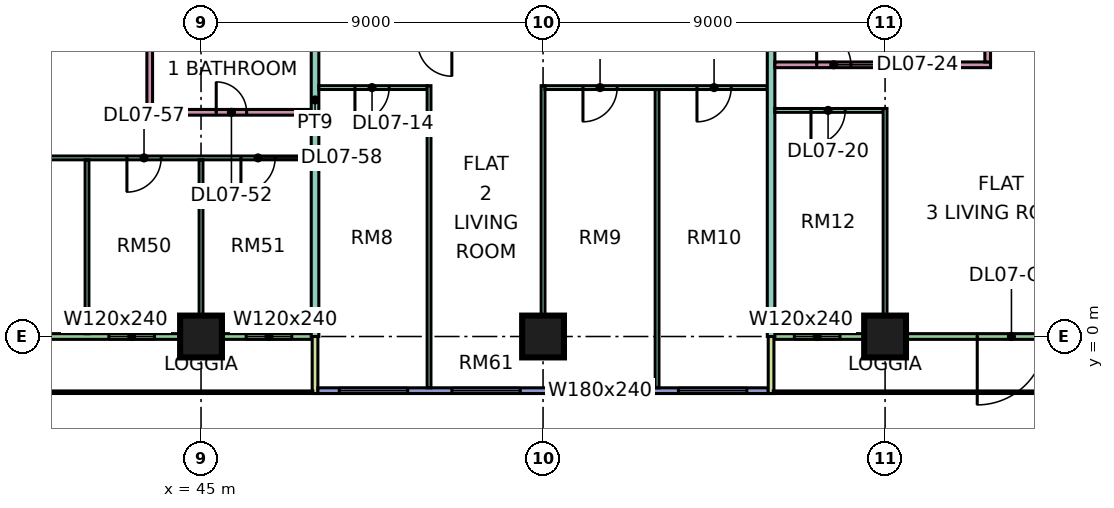
"""IFC4 building model, lengths in metres.
Left out: names, types, materials, properties, quantities, classifications, styles, units other than length and angle.
Written with IfcOpenShell. Run it as: python <this file> out.ifc"""

import sys

from ifc_helpers import new_model, si_unit, direction, frame, frame_2d, origin, origin_2d, place, context, subcontext, project, spatial, rectangle, extrude, element, fill, save


model = new_model("IFC4")
c1 = context("Model", 3, precision=1e-05, world=origin(), true_north=direction((0.0, 1.0)))
c2 = subcontext(c1, "Body", "Model", "MODEL_VIEW")
j1 = project(units=[si_unit("LENGTHUNIT", "METRE"), si_unit("PLANEANGLEUNIT", "RADIAN")], contexts=[c1])
p1 = place(None, origin())
s1 = spatial("IfcSite", under=j1, at=p1, CompositionType="ELEMENT")
p2 = place(p1, origin())
s2 = spatial("IfcBuilding", under=s1, at=p2, CompositionType="ELEMENT")
p3 = place(p2, frame((0.0, 0.0, 41.4)))
s3 = spatial("IfcBuildingStorey", under=s2, at=p3, CompositionType="ELEMENT", Elevation=41.4)
for number, where, z_axis, x_axis in (
    (1, (45.0, 0.0, 0.0), (0.0, 0.0, 1.0), (1.0, 0.0, 0.0)),
    (2, (54.0, 0.0, 0.0), (0.0, 0.0, 1.0), (1.0, 0.0, 0.0)),
    (3, (63.0, 0.0, 0.0), (0.0, 0.0, 1.0), (1.0, 0.0, 0.0)),
):
    element("IfcColumn", number, at=place(p3, frame(where, z_axis=z_axis, x_axis=x_axis)), inside=s3, PredefinedType="COLUMN", context=c2, shape_type="SweptSolid", body=[
        extrude(rectangle(XDim=1.1, YDim=1.1, at=origin_2d()), origin(), (0.0, 0.0, 1.0), 3.75),
    ])
p4 = place(p3, frame((36.075, 0.0, 0.0), z_axis=(0.0, 0.0, 1.0), x_axis=(1.0, 0.0, 0.0)))
e4 = element("IfcWall", 4, at=p4, inside=s3, PredefinedType="SOLIDWALL", context=c2, shape_type="SweptSolid", body=[
    extrude(rectangle(XDim=11.85, YDim=0.15, at=frame_2d((5.925, 0.0))), origin(), (0.0, 0.0, 1.0), 3.35),
])
p5 = place(p4, frame((2.35, 0.0, 0.0)))
e5 = element("IfcOpeningElement", 5, at=p5, cuts=e4, PredefinedType="OPENING", context=c2, shape_type="SweptSolid", body=[
    extrude(rectangle(XDim=1.8, YDim=2.4, at=frame_2d((0.9, 1.2))), frame((0.0, 0.085, 0.0), z_axis=(0.0, -1.0, 0.0), x_axis=(1.0, 0.0, 0.0)), (0.0, 0.0, 1.0), 0.17),
])
p6 = place(p4, frame((6.5, 0.0, 0.45)))
e6 = element("IfcOpeningElement", 6, at=p6, cuts=e4, PredefinedType="OPENING", context=c2, shape_type="SweptSolid", body=[
    extrude(rectangle(XDim=1.2, YDim=2.4, at=frame_2d((0.6, 1.2))), frame((0.0, 0.085, 0.0), z_axis=(0.0, -1.0, 0.0), x_axis=(1.0, 0.0, 0.0)), (0.0, 0.0, 1.0), 0.17),
])
p7 = place(p4, frame((10.113, 0.0, 0.45)))
e7 = element("IfcOpeningElement", 7, at=p7, cuts=e4, PredefinedType="OPENING", context=c2, shape_type="SweptSolid", body=[
    extrude(rectangle(XDim=1.2, YDim=2.4, at=frame_2d((0.6, 1.2))), frame((0.0, 0.085, 0.0), z_axis=(0.0, -1.0, 0.0), x_axis=(1.0, 0.0, 0.0)), (0.0, 0.0, 1.0), 0.17),
])
p8 = place(p3, frame((48.0, -1.5, 0.0), z_axis=(0.0, 0.0, 1.0), x_axis=(0.0, 1.0, 0.0)))
e8 = element("IfcWall", 8, at=p8, inside=s3, PredefinedType="SOLIDWALL", context=c2, shape_type="SweptSolid", body=[
    extrude(rectangle(XDim=1.5, YDim=0.15, at=frame_2d((0.75, 0.0))), origin(), (0.0, 0.0, 1.0), 3.35),
])
p9 = place(p3, frame((48.075, -1.425, 0.0), z_axis=(0.0, 0.0, 1.0), x_axis=(1.0, 0.0, 0.0)))
e9 = element("IfcWall", 9, at=p9, inside=s3, PredefinedType="SOLIDWALL", context=c2, shape_type="SweptSolid", body=[
    extrude(rectangle(XDim=11.85, YDim=0.15, at=frame_2d((5.925, 0.0))), origin(), (0.0, 0.0, 1.0), 3.35),
])
p10 = place(p9, frame((0.562, 0.0, 0.45)))
e10 = element("IfcOpeningElement", 10, at=p10, cuts=e9, PredefinedType="OPENING", context=c2, shape_type="SweptSolid", body=[
    extrude(rectangle(XDim=1.8, YDim=2.4, at=frame_2d((0.9, 1.2))), frame((0.0, 0.085, 0.0), z_axis=(0.0, -1.0, 0.0), x_axis=(1.0, 0.0, 0.0)), (0.0, 0.0, 1.0), 0.17),
])
p11 = place(p9, frame((3.525, 0.0, 0.45)))
e11 = element("IfcOpeningElement", 11, at=p11, cuts=e9, PredefinedType="OPENING", context=c2, shape_type="SweptSolid", body=[
    extrude(rectangle(XDim=1.8, YDim=2.4, at=frame_2d((0.9, 1.2))), frame((0.0, 0.085, 0.0), z_axis=(0.0, -1.0, 0.0), x_axis=(1.0, 0.0, 0.0)), (0.0, 0.0, 1.0), 0.17),
])
p12 = place(p9, frame((6.525, 0.0, 0.45)))
e12 = element("IfcOpeningElement", 12, at=p12, cuts=e9, PredefinedType="OPENING", context=c2, shape_type="SweptSolid", body=[
    extrude(rectangle(XDim=1.8, YDim=2.4, at=frame_2d((0.9, 1.2))), frame((0.0, 0.085, 0.0), z_axis=(0.0, -1.0, 0.0), x_axis=(1.0, 0.0, 0.0)), (0.0, 0.0, 1.0), 0.17),
])
p13 = place(p9, frame((9.488, 0.0, 0.45)))
e13 = element("IfcOpeningElement", 13, at=p13, cuts=e9, PredefinedType="OPENING", context=c2, shape_type="SweptSolid", body=[
    extrude(rectangle(XDim=1.8, YDim=2.4, at=frame_2d((0.9, 1.2))), frame((0.0, 0.085, 0.0), z_axis=(0.0, -1.0, 0.0), x_axis=(1.0, 0.0, 0.0)), (0.0, 0.0, 1.0), 0.17),
])
p14 = place(p3, frame((60.075, 0.0, 0.0), z_axis=(0.0, 0.0, 1.0), x_axis=(1.0, 0.0, 0.0)))
e14 = element("IfcWall", 14, at=p14, inside=s3, PredefinedType="SOLIDWALL", context=c2, shape_type="SweptSolid", body=[
    extrude(rectangle(XDim=10.35, YDim=0.15, at=frame_2d((5.175, 0.0))), origin(), (0.0, 0.0, 1.0), 3.35),
])
p15 = place(p14, frame((0.538, 0.0, 0.45)))
e15 = element("IfcOpeningElement", 15, at=p15, cuts=e14, PredefinedType="OPENING", context=c2, shape_type="SweptSolid", body=[
    extrude(rectangle(XDim=1.2, YDim=2.4, at=frame_2d((0.6, 1.2))), frame((0.0, 0.085, 0.0), z_axis=(0.0, -1.0, 0.0), x_axis=(1.0, 0.0, 0.0)), (0.0, 0.0, 1.0), 0.17),
])
p16 = place(p14, frame((5.35, 0.0, 0.0)))
e16 = element("IfcOpeningElement", 16, at=p16, cuts=e14, PredefinedType="OPENING", context=c2, shape_type="SweptSolid", body=[
    extrude(rectangle(XDim=1.8, YDim=2.4, at=frame_2d((0.9, 1.2))), frame((0.0, 0.085, 0.0), z_axis=(0.0, -1.0, 0.0), x_axis=(1.0, 0.0, 0.0)), (0.0, 0.0, 1.0), 0.17),
])
p17 = place(p14, frame((9.188, 0.0, 0.45)))
e17 = element("IfcOpeningElement", 17, at=p17, cuts=e14, PredefinedType="OPENING", context=c2, shape_type="SweptSolid", body=[
    extrude(rectangle(XDim=0.9, YDim=2.4, at=frame_2d((0.45, 1.2))), frame((0.0, 0.085, 0.0), z_axis=(0.0, -1.0, 0.0), x_axis=(1.0, 0.0, 0.0)), (0.0, 0.0, 1.0), 0.17),
])
p18 = place(p3, frame((60.0, -1.5, 0.0), z_axis=(0.0, 0.0, 1.0), x_axis=(0.0, 1.0, 0.0)))
e18 = element("IfcWall", 18, at=p18, inside=s3, PredefinedType="SOLIDWALL", context=c2, shape_type="SweptSolid", body=[
    extrude(rectangle(XDim=1.5, YDim=0.15, at=frame_2d((0.75, 0.0))), origin(), (0.0, 0.0, 1.0), 3.35),
])
p19 = place(p3, frame((33.05, 4.7, 0.0), z_axis=(0.0, 0.0, 1.0), x_axis=(1.0, 0.0, 0.0)))
e19 = element("IfcWall", 19, at=p19, inside=s3, PredefinedType="PARTITIONING", context=c2, shape_type="SweptSolid", body=[
    extrude(rectangle(XDim=14.85, YDim=0.1, at=frame_2d((7.425, 0.0))), origin(), (0.0, 0.0, 1.0), 3.35),
])
p20 = place(p19, frame((10.0, 0.0, 0.0)))
e20 = element("IfcOpeningElement", 20, at=p20, cuts=e19, PredefinedType="OPENING", context=c2, shape_type="SweptSolid", body=[
    extrude(rectangle(XDim=0.9, YDim=2.1, at=frame_2d((0.45, 1.05))), frame((0.0, 0.06, 0.0), z_axis=(0.0, -1.0, 0.0), x_axis=(1.0, 0.0, 0.0)), (0.0, 0.0, 1.0), 0.12),
])
p21 = place(p19, frame((13.0, 0.0, 0.0)))
e21 = element("IfcOpeningElement", 21, at=p21, cuts=e19, PredefinedType="OPENING", context=c2, shape_type="SweptSolid", body=[
    extrude(rectangle(XDim=0.9, YDim=2.1, at=frame_2d((0.45, 1.05))), frame((0.0, 0.06, 0.0), z_axis=(0.0, -1.0, 0.0), x_axis=(1.0, 0.0, 0.0)), (0.0, 0.0, 1.0), 0.12),
])
p22 = place(p19, frame((4.0, 0.0, 0.0)))
e22 = element("IfcOpeningElement", 22, at=p22, cuts=e19, PredefinedType="OPENING", context=c2, shape_type="SweptSolid", body=[
    extrude(rectangle(XDim=0.9, YDim=2.1, at=frame_2d((0.45, 1.05))), frame((0.0, 0.06, 0.0), z_axis=(0.0, -1.0, 0.0), x_axis=(1.0, 0.0, 0.0)), (0.0, 0.0, 1.0), 0.12),
])
p23 = place(p3, frame((42.0, 0.074, 0.0), z_axis=(0.0, 0.0, 1.0), x_axis=(0.0, 1.0, 0.0)))
e23 = element("IfcWall", 23, at=p23, inside=s3, PredefinedType="PARTITIONING", context=c2, shape_type="SweptSolid", body=[
    extrude(rectangle(XDim=4.576, YDim=0.1, at=frame_2d((2.288, 0.0))), origin(), (0.0, 0.0, 1.0), 3.35),
])
p24 = place(p3, frame((43.65, 5.825, 0.0), z_axis=(0.0, 0.0, 1.0), x_axis=(0.0, 1.0, 0.0)))
e24 = element("IfcWall", 24, at=p24, inside=s3, PredefinedType="PARTITIONING", context=c2, shape_type="SweptSolid", body=[
    extrude(rectangle(XDim=6.625, YDim=0.15, at=frame_2d((3.312, 0.0))), origin(), (0.0, 0.0, 1.0), 3.35),
])
p25 = place(p24, frame((4.425, 0.0, 0.0)))
e25 = element("IfcOpeningElement", 25, at=p25, cuts=e24, PredefinedType="OPENING", context=c2, shape_type="SweptSolid", body=[
    extrude(rectangle(XDim=0.9, YDim=2.1, at=frame_2d((0.45, 1.05))), frame((0.0, 0.085, 0.0), z_axis=(0.0, -1.0, 0.0), x_axis=(1.0, 0.0, 0.0)), (0.0, 0.0, 1.0), 0.17),
])
p26 = place(p3, frame((43.725, 5.9, 0.0), z_axis=(0.0, 0.0, 1.0), x_axis=(1.0, 0.0, 0.0)))
e26 = element("IfcWall", 26, at=p26, inside=s3, PredefinedType="PARTITIONING", context=c2, shape_type="SweptSolid", body=[
    extrude(rectangle(XDim=4.175, YDim=0.15, at=frame_2d((2.087, 0.0))), origin(), (0.0, 0.0, 1.0), 3.35),
])
p27 = place(p26, frame((1.675, 0.0, 0.0)))
e27 = element("IfcOpeningElement", 27, at=p27, cuts=e26, PredefinedType="OPENING", context=c2, shape_type="SweptSolid", body=[
    extrude(rectangle(XDim=0.8, YDim=2.1, at=frame_2d((0.4, 1.05))), frame((0.0, 0.085, 0.0), z_axis=(0.0, -1.0, 0.0), x_axis=(1.0, 0.0, 0.0)), (0.0, 0.0, 1.0), 0.17),
])
p28 = place(p3, frame((45.0, 0.074, 0.0), z_axis=(0.0, 0.0, 1.0), x_axis=(0.0, 1.0, 0.0)))
e28 = element("IfcWall", 28, at=p28, inside=s3, PredefinedType="PARTITIONING", context=c2, shape_type="SweptSolid", body=[
    extrude(rectangle(XDim=4.576, YDim=0.1, at=frame_2d((2.288, 0.0))), origin(), (0.0, 0.0, 1.0), 3.35),
])
p29 = place(p3, frame((48.0, 0.0, 0.0), z_axis=(0.0, 0.0, 1.0), x_axis=(0.0, 1.0, 0.0)))
e29 = element("IfcWall", 29, at=p29, inside=s3, PredefinedType="PARTITIONING", context=c2, shape_type="SweptSolid", body=[
    extrude(rectangle(XDim=12.45, YDim=0.2, at=frame_2d((6.225, 0.0))), origin(), (0.0, 0.0, 1.0), 3.35),
])
p30 = place(p3, frame((48.1, 6.55, 0.0), z_axis=(0.0, 0.0, 1.0), x_axis=(1.0, 0.0, 0.0)))
e30 = element("IfcWall", 30, at=p30, inside=s3, PredefinedType="PARTITIONING", context=c2, shape_type="SweptSolid", body=[
    extrude(rectangle(XDim=2.85, YDim=0.1, at=frame_2d((1.425, 0.0))), origin(), (0.0, 0.0, 1.0), 3.35),
])
p31 = place(p30, frame((0.95, 0.0, 0.0)))
e31 = element("IfcOpeningElement", 31, at=p31, cuts=e30, PredefinedType="OPENING", context=c2, shape_type="SweptSolid", body=[
    extrude(rectangle(XDim=0.9, YDim=2.1, at=frame_2d((0.45, 1.05))), frame((0.0, 0.06, 0.0), z_axis=(0.0, -1.0, 0.0), x_axis=(1.0, 0.0, 0.0)), (0.0, 0.0, 1.0), 0.12),
])
p32 = place(p3, frame((51.0, -1.35, 0.0), z_axis=(0.0, 0.0, 1.0), x_axis=(0.0, 1.0, 0.0)))
e32 = element("IfcWall", 32, at=p32, inside=s3, PredefinedType="PARTITIONING", context=c2, shape_type="SweptSolid", body=[
    extrude(rectangle(XDim=7.95, YDim=0.1, at=frame_2d((3.975, 0.0))), origin(), (0.0, 0.0, 1.0), 3.35),
])
p33 = place(p3, frame((54.0, 0.0, 0.0), z_axis=(0.0, 0.0, 1.0), x_axis=(0.0, 1.0, 0.0)))
e33 = element("IfcWall", 33, at=p33, inside=s3, PredefinedType="PARTITIONING", context=c2, shape_type="SweptSolid", body=[
    extrude(rectangle(XDim=6.6, YDim=0.1, at=frame_2d((3.3, 0.0))), origin(), (0.0, 0.0, 1.0), 3.35),
])
p34 = place(p3, frame((54.05, 6.55, 0.0), z_axis=(0.0, 0.0, 1.0), x_axis=(1.0, 0.0, 0.0)))
e34 = element("IfcWall", 34, at=p34, inside=s3, PredefinedType="PARTITIONING", context=c2, shape_type="SweptSolid", body=[
    extrude(rectangle(XDim=5.85, YDim=0.1, at=frame_2d((2.925, 0.0))), origin(), (0.0, 0.0, 1.0), 3.35),
])
p35 = place(p34, frame((1.0, 0.0, 0.0)))
e35 = element("IfcOpeningElement", 35, at=p35, cuts=e34, PredefinedType="OPENING", context=c2, shape_type="SweptSolid", body=[
    extrude(rectangle(XDim=0.9, YDim=2.1, at=frame_2d((0.45, 1.05))), frame((0.0, 0.06, 0.0), z_axis=(0.0, -1.0, 0.0), x_axis=(1.0, 0.0, 0.0)), (0.0, 0.0, 1.0), 0.12),
])
p36 = place(p34, frame((4.0, 0.0, 0.0)))
e36 = element("IfcOpeningElement", 36, at=p36, cuts=e34, PredefinedType="OPENING", context=c2, shape_type="SweptSolid", body=[
    extrude(rectangle(XDim=0.9, YDim=2.1, at=frame_2d((0.45, 1.05))), frame((0.0, 0.06, 0.0), z_axis=(0.0, -1.0, 0.0), x_axis=(1.0, 0.0, 0.0)), (0.0, 0.0, 1.0), 0.12),
])
p37 = place(p3, frame((57.0, -1.351, 0.0), z_axis=(0.0, 0.0, 1.0), x_axis=(0.0, 1.0, 0.0)))
e37 = element("IfcWall", 37, at=p37, inside=s3, PredefinedType="PARTITIONING", context=c2, shape_type="SweptSolid", body=[
    extrude(rectangle(XDim=7.851, YDim=0.1, at=frame_2d((3.926, 0.0))), origin(), (0.0, 0.0, 1.0), 3.35),
])
p38 = place(p3, frame((60.0, 0.0, 0.0), z_axis=(0.0, 0.0, 1.0), x_axis=(0.0, 1.0, 0.0)))
e38 = element("IfcWall", 38, at=p38, inside=s3, PredefinedType="PARTITIONING", context=c2, shape_type="SweptSolid", body=[
    extrude(rectangle(XDim=12.45, YDim=0.2, at=frame_2d((6.225, 0.0))), origin(), (0.0, 0.0, 1.0), 3.35),
])
p39 = place(p3, frame((60.1, 5.95, 0.0), z_axis=(0.0, 0.0, 1.0), x_axis=(1.0, 0.0, 0.0)))
e39 = element("IfcWall", 39, at=p39, inside=s3, PredefinedType="PARTITIONING", context=c2, shape_type="SweptSolid", body=[
    extrude(rectangle(XDim=2.85, YDim=0.1, at=frame_2d((1.425, 0.0))), origin(), (0.0, 0.0, 1.0), 3.35),
])
p40 = place(p39, frame((0.95, 0.0, 0.0)))
e40 = element("IfcOpeningElement", 40, at=p40, cuts=e39, PredefinedType="OPENING", context=c2, shape_type="SweptSolid", body=[
    extrude(rectangle(XDim=0.9, YDim=2.1, at=frame_2d((0.45, 1.05))), frame((0.0, 0.06, 0.0), z_axis=(0.0, -1.0, 0.0), x_axis=(1.0, 0.0, 0.0)), (0.0, 0.0, 1.0), 0.12),
])
p41 = place(p3, frame((60.1, 7.15, 0.0), z_axis=(0.0, 0.0, 1.0), x_axis=(1.0, 0.0, 0.0)))
e41 = element("IfcWall", 41, at=p41, inside=s3, PredefinedType="PARTITIONING", context=c2, shape_type="SweptSolid", body=[
    extrude(rectangle(XDim=5.675, YDim=0.15, at=frame_2d((2.837, 0.0))), origin(), (0.0, 0.0, 1.0), 3.35),
])
p42 = place(p41, frame((1.1, 0.0, 0.0)))
e42 = element("IfcOpeningElement", 42, at=p42, cuts=e41, PredefinedType="OPENING", context=c2, shape_type="SweptSolid", body=[
    extrude(rectangle(XDim=0.9, YDim=2.1, at=frame_2d((0.45, 1.05))), frame((0.0, 0.085, 0.0), z_axis=(0.0, -1.0, 0.0), x_axis=(1.0, 0.0, 0.0)), (0.0, 0.0, 1.0), 0.17),
])
p43 = place(p3, frame((63.0, 0.074, 0.0), z_axis=(0.0, 0.0, 1.0), x_axis=(0.0, 1.0, 0.0)))
e43 = element("IfcWall", 43, at=p43, inside=s3, PredefinedType="PARTITIONING", context=c2, shape_type="SweptSolid", body=[
    extrude(rectangle(XDim=5.926, YDim=0.1, at=frame_2d((2.963, 0.0))), origin(), (0.0, 0.0, 1.0), 3.35),
])
p44 = place(p3, frame((63.3, 7.225, 0.0), z_axis=(0.0, 0.0, 1.0), x_axis=(0.0, 1.0, 0.0)))
e44 = element("IfcWall", 44, at=p44, inside=s3, PredefinedType="PARTITIONING", context=c2, shape_type="SweptSolid", body=[
    extrude(rectangle(XDim=5.225, YDim=0.15, at=frame_2d((2.612, 0.0))), origin(), (0.0, 0.0, 1.0), 3.35),
])
p45 = place(p3, frame((65.7, 7.225, 0.0), z_axis=(0.0, 0.0, 1.0), x_axis=(0.0, 1.0, 0.0)))
e45 = element("IfcWall", 45, at=p45, inside=s3, PredefinedType="PARTITIONING", context=c2, shape_type="SweptSolid", body=[
    extrude(rectangle(XDim=5.225, YDim=0.15, at=frame_2d((2.612, 0.0))), origin(), (0.0, 0.0, 1.0), 3.35),
])
p46 = place(p45, frame((2.275, 0.0, 0.0)))
e46 = element("IfcOpeningElement", 46, at=p46, cuts=e45, PredefinedType="OPENING", context=c2, shape_type="SweptSolid", body=[
    extrude(rectangle(XDim=0.8, YDim=2.1, at=frame_2d((0.4, 1.05))), frame((0.0, 0.085, 0.0), z_axis=(0.0, -1.0, 0.0), x_axis=(1.0, 0.0, 0.0)), (0.0, 0.0, 1.0), 0.17),
])
p47 = place(p6, origin())
e47 = element("IfcWindow", 47, at=p47, inside=s3, PartitioningType="SINGLE_PANEL", PredefinedType="WINDOW", context=c2, shape_type="SweptSolid", body=[
    extrude(rectangle(XDim=1.2, YDim=2.4, at=frame_2d((0.6, 1.2))), frame((0.0, 0.03, 0.0), z_axis=(0.0, -1.0, 0.0), x_axis=(1.0, 0.0, 0.0)), (0.0, 0.0, 1.0), 0.06),
])
fill(e6, e47)
p48 = place(p7, origin())
e48 = element("IfcWindow", 48, at=p48, inside=s3, PartitioningType="SINGLE_PANEL", PredefinedType="WINDOW", context=c2, shape_type="SweptSolid", body=[
    extrude(rectangle(XDim=1.2, YDim=2.4, at=frame_2d((0.6, 1.2))), frame((0.0, 0.03, 0.0), z_axis=(0.0, -1.0, 0.0), x_axis=(1.0, 0.0, 0.0)), (0.0, 0.0, 1.0), 0.06),
])
fill(e7, e48)
p49 = place(p10, origin())
e49 = element("IfcWindow", 49, at=p49, inside=s3, PartitioningType="SINGLE_PANEL", PredefinedType="WINDOW", context=c2, shape_type="SweptSolid", body=[
    extrude(rectangle(XDim=1.8, YDim=2.4, at=frame_2d((0.9, 1.2))), frame((0.0, 0.03, 0.0), z_axis=(0.0, -1.0, 0.0), x_axis=(1.0, 0.0, 0.0)), (0.0, 0.0, 1.0), 0.06),
])
fill(e10, e49)
p50 = place(p11, origin())
e50 = element("IfcWindow", 50, at=p50, inside=s3, PartitioningType="SINGLE_PANEL", PredefinedType="WINDOW", context=c2, shape_type="SweptSolid", body=[
    extrude(rectangle(XDim=1.8, YDim=2.4, at=frame_2d((0.9, 1.2))), frame((0.0, 0.03, 0.0), z_axis=(0.0, -1.0, 0.0), x_axis=(1.0, 0.0, 0.0)), (0.0, 0.0, 1.0), 0.06),
])
fill(e11, e50)
p51 = place(p12, origin())
e51 = element("IfcWindow", 51, at=p51, inside=s3, PartitioningType="SINGLE_PANEL", PredefinedType="WINDOW", context=c2, shape_type="SweptSolid", body=[
    extrude(rectangle(XDim=1.8, YDim=2.4, at=frame_2d((0.9, 1.2))), frame((0.0, 0.03, 0.0), z_axis=(0.0, -1.0, 0.0), x_axis=(1.0, 0.0, 0.0)), (0.0, 0.0, 1.0), 0.06),
])
fill(e12, e51)
p52 = place(p13, origin())
e52 = element("IfcWindow", 52, at=p52, inside=s3, PartitioningType="SINGLE_PANEL", PredefinedType="WINDOW", context=c2, shape_type="SweptSolid", body=[
    extrude(rectangle(XDim=1.8, YDim=2.4, at=frame_2d((0.9, 1.2))), frame((0.0, 0.03, 0.0), z_axis=(0.0, -1.0, 0.0), x_axis=(1.0, 0.0, 0.0)), (0.0, 0.0, 1.0), 0.06),
])
fill(e13, e52)
p53 = place(p15, origin())
e53 = element("IfcWindow", 53, at=p53, inside=s3, PartitioningType="SINGLE_PANEL", PredefinedType="WINDOW", context=c2, shape_type="SweptSolid", body=[
    extrude(rectangle(XDim=1.2, YDim=2.4, at=frame_2d((0.6, 1.2))), frame((0.0, 0.03, 0.0), z_axis=(0.0, -1.0, 0.0), x_axis=(1.0, 0.0, 0.0)), (0.0, 0.0, 1.0), 0.06),
])
fill(e15, e53)
p54 = place(p16, frame((1.8, 0.0, 0.0), z_axis=(0.0, 0.0, 1.0), x_axis=(-1.0, 0.0, 0.0)))
e54 = element("IfcDoor", 54, at=p54, inside=s3, OperationType="DOUBLE_DOOR_SINGLE_SWING", PredefinedType="DOOR", context=c2, shape_type="SweptSolid", body=[
    extrude(rectangle(XDim=1.8, YDim=2.4, at=frame_2d((0.9, 1.2))), frame((0.0, 0.025, 0.0), z_axis=(0.0, -1.0, 0.0), x_axis=(1.0, 0.0, 0.0)), (0.0, 0.0, 1.0), 0.05),
])
fill(e16, e54)
p55 = place(p31, frame((0.9, 0.0, 0.0), z_axis=(0.0, 0.0, 1.0), x_axis=(-1.0, 0.0, 0.0)))
e55 = element("IfcDoor", 55, at=p55, inside=s3, OperationType="SINGLE_SWING_LEFT", PredefinedType="DOOR", context=c2, shape_type="SweptSolid", body=[
    extrude(rectangle(XDim=0.9, YDim=2.1, at=frame_2d((0.45, 1.05))), frame((0.0, 0.025, 0.0), z_axis=(0.0, -1.0, 0.0), x_axis=(1.0, 0.0, 0.0)), (0.0, 0.0, 1.0), 0.05),
])
fill(e31, e55)
p56 = place(p35, frame((0.9, 0.0, 0.0), z_axis=(0.0, 0.0, 1.0), x_axis=(-1.0, 0.0, 0.0)))
e56 = element("IfcDoor", 56, at=p56, inside=s3, OperationType="SINGLE_SWING_LEFT", PredefinedType="DOOR", context=c2, shape_type="SweptSolid", body=[
    extrude(rectangle(XDim=0.9, YDim=2.1, at=frame_2d((0.45, 1.05))), frame((0.0, 0.025, 0.0), z_axis=(0.0, -1.0, 0.0), x_axis=(1.0, 0.0, 0.0)), (0.0, 0.0, 1.0), 0.05),
])
fill(e35, e56)
p57 = place(p36, frame((0.9, 0.0, 0.0), z_axis=(0.0, 0.0, 1.0), x_axis=(-1.0, 0.0, 0.0)))
e57 = element("IfcDoor", 57, at=p57, inside=s3, OperationType="SINGLE_SWING_LEFT", PredefinedType="DOOR", context=c2, shape_type="SweptSolid", body=[
    extrude(rectangle(XDim=0.9, YDim=2.1, at=frame_2d((0.45, 1.05))), frame((0.0, 0.025, 0.0), z_axis=(0.0, -1.0, 0.0), x_axis=(1.0, 0.0, 0.0)), (0.0, 0.0, 1.0), 0.05),
])
fill(e36, e57)
p58 = place(p40, frame((0.9, 0.0, 0.0), z_axis=(0.0, 0.0, 1.0), x_axis=(-1.0, 0.0, 0.0)))
e58 = element("IfcDoor", 58, at=p58, inside=s3, OperationType="SINGLE_SWING_LEFT", PredefinedType="DOOR", context=c2, shape_type="SweptSolid", body=[
    extrude(rectangle(XDim=0.9, YDim=2.1, at=frame_2d((0.45, 1.05))), frame((0.0, 0.025, 0.0), z_axis=(0.0, -1.0, 0.0), x_axis=(1.0, 0.0, 0.0)), (0.0, 0.0, 1.0), 0.05),
])
fill(e40, e58)
p59 = place(p42, origin())
e59 = element("IfcDoor", 59, at=p59, inside=s3, OperationType="SINGLE_SWING_LEFT", PredefinedType="DOOR", context=c2, shape_type="SweptSolid", body=[
    extrude(rectangle(XDim=0.9, YDim=2.1, at=frame_2d((0.45, 1.05))), frame((0.0, 0.025, 0.0), z_axis=(0.0, -1.0, 0.0), x_axis=(1.0, 0.0, 0.0)), (0.0, 0.0, 1.0), 0.05),
])
fill(e42, e59)
p60 = place(p27, origin())
e60 = element("IfcDoor", 60, at=p60, inside=s3, OperationType="SINGLE_SWING_LEFT", PredefinedType="DOOR", context=c2, shape_type="SweptSolid", body=[
    extrude(rectangle(XDim=0.8, YDim=2.1, at=frame_2d((0.4, 1.05))), frame((0.0, 0.025, 0.0), z_axis=(0.0, -1.0, 0.0), x_axis=(1.0, 0.0, 0.0)), (0.0, 0.0, 1.0), 0.05),
])
fill(e27, e60)
p61 = place(p20, frame((0.9, 0.0, 0.0), z_axis=(0.0, 0.0, 1.0), x_axis=(-1.0, 0.0, 0.0)))
e61 = element("IfcDoor", 61, at=p61, inside=s3, OperationType="SINGLE_SWING_LEFT", PredefinedType="DOOR", context=c2, shape_type="SweptSolid", body=[
    extrude(rectangle(XDim=0.9, YDim=2.1, at=frame_2d((0.45, 1.05))), frame((0.0, 0.025, 0.0), z_axis=(0.0, -1.0, 0.0), x_axis=(1.0, 0.0, 0.0)), (0.0, 0.0, 1.0), 0.05),
])
fill(e20, e61)
p62 = place(p21, frame((0.9, 0.0, 0.0), z_axis=(0.0, 0.0, 1.0), x_axis=(-1.0, 0.0, 0.0)))
e62 = element("IfcDoor", 62, at=p62, inside=s3, OperationType="SINGLE_SWING_LEFT", PredefinedType="DOOR", context=c2, shape_type="SweptSolid", body=[
    extrude(rectangle(XDim=0.9, YDim=2.1, at=frame_2d((0.45, 1.05))), frame((0.0, 0.025, 0.0), z_axis=(0.0, -1.0, 0.0), x_axis=(1.0, 0.0, 0.0)), (0.0, 0.0, 1.0), 0.05),
])
fill(e21, e62)
save(model, sys.argv[1])
